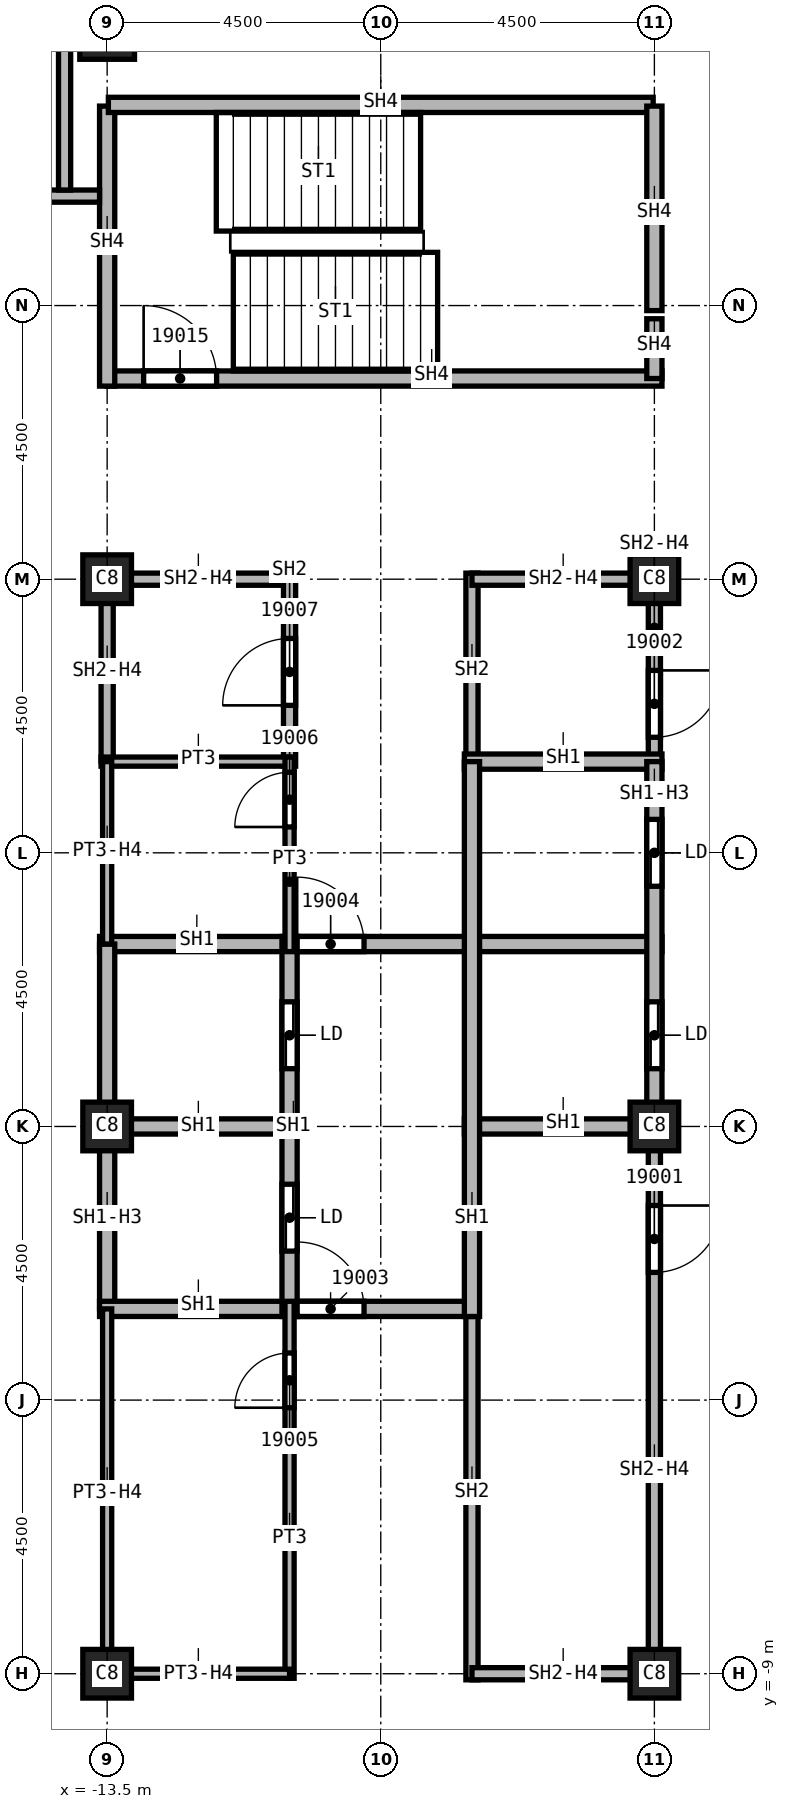
"""IFC4 building model, lengths in metres.
Left out: names, types, materials, properties, quantities, classifications, styles, units other than length and angle.
Written with IfcOpenShell. Run it as: python <this file> out.ifc"""

import sys

from ifc_helpers import new_model, si_unit, direction, frame, frame_2d, origin, origin_2d, place, context, subcontext, project, spatial, rectangle, extrude, element, fill, save


model = new_model("IFC4")
c1 = context("Model", 3, precision=1e-05, world=origin(), true_north=direction((0.0, 1.0)))
c2 = subcontext(c1, "Body", "Model", "MODEL_VIEW")
j1 = project(units=[si_unit("LENGTHUNIT", "METRE"), si_unit("PLANEANGLEUNIT", "RADIAN")], contexts=[c1])
p1 = place(None, origin())
s1 = spatial("IfcSite", under=j1, at=p1, CompositionType="ELEMENT")
p2 = place(p1, origin())
s2 = spatial("IfcBuilding", under=s1, at=p2, CompositionType="ELEMENT")
p3 = place(p2, frame((0.0, 0.0, 282.0)))
s3 = spatial("IfcBuildingStorey", under=s2, at=p3, CompositionType="ELEMENT", Elevation=282.0)
p4 = place(p3, frame((-13.5, 18.0, 0.0), z_axis=(0.0, 0.0, 1.0), x_axis=(1.0, 0.0, 0.0)))
e1 = element("IfcColumn", 1, at=p4, inside=s3, PredefinedType="COLUMN", context=c2, shape_type="SweptSolid", body=[
    extrude(rectangle(XDim=0.9, YDim=0.9, at=origin_2d()), origin(), (0.0, 0.0, 1.0), 3.72),
])
for number, where, z_axis, x_axis in (
    (2, (-4.5, 0.0, 0.0), (0.0, 0.0, 1.0), (1.0, 0.0, 0.0)),
    (3, (-4.5, 9.0, 0.0), (0.0, 0.0, 1.0), (1.0, 0.0, 0.0)),
    (4, (-4.5, -9.0, 0.0), (0.0, 0.0, 1.0), (1.0, 0.0, 0.0)),
    (5, (-13.5, 0.0, 0.0), (0.0, 0.0, 1.0), (1.0, 0.0, 0.0)),
    (6, (-13.5, 9.0, 0.0), (0.0, 0.0, 1.0), (1.0, 0.0, 0.0)),
    (7, (-13.5, -9.0, 0.0), (0.0, 0.0, 1.0), (1.0, 0.0, 0.0)),
):
    element("IfcColumn", number, at=place(p3, frame(where, z_axis=z_axis, x_axis=x_axis)), inside=s3, PredefinedType="COLUMN", context=c2, shape_type="SweptSolid", body=[
        extrude(rectangle(XDim=0.8, YDim=0.8, at=origin_2d()), origin(), (0.0, 0.0, 1.0), 3.72),
    ])
p5 = place(p3, frame((-13.5, 6.0, 0.0), z_axis=(0.0, 0.0, 1.0), x_axis=(0.0, 1.0, 0.0)))
e8 = element("IfcWall", 8, at=p5, inside=s3, PredefinedType="SOLIDWALL", context=c2, shape_type="SweptSolid", body=[
    extrude(rectangle(XDim=3.1, YDim=0.2, at=frame_2d((1.55, 0.0))), origin(), (0.0, 0.0, 1.0), 3.042),
])
p6 = place(p3, frame((-13.5, 9.0, 0.0), z_axis=(0.0, 0.0, 1.0), x_axis=(1.0, 0.0, 0.0)))
e9 = element("IfcWall", 9, at=p6, inside=s3, PredefinedType="SOLIDWALL", context=c2, shape_type="SweptSolid", body=[
    extrude(rectangle(XDim=3.0, YDim=0.2, at=frame_2d((1.5, 0.0))), origin(), (0.0, 0.0, 1.0), 3.042),
])
p7 = place(p3, frame((-10.5, 5.925, 0.0), z_axis=(0.0, 0.0, 1.0), x_axis=(0.0, 1.0, 0.0)))
e10 = element("IfcWall", 10, at=p7, inside=s3, PredefinedType="SOLIDWALL", context=c2, shape_type="SweptSolid", body=[
    extrude(rectangle(XDim=3.175, YDim=0.2, at=frame_2d((1.587, 0.0))), origin(), (0.0, 0.0, 1.0), 3.72),
])
p8 = place(p7, frame((1.0, 0.0, 0.0)))
e11 = element("IfcOpeningElement", 11, at=p8, cuts=e10, PredefinedType="OPENING", context=c2, shape_type="SweptSolid", body=[
    extrude(rectangle(XDim=1.1, YDim=2.1, at=frame_2d((0.55, 1.05))), frame((0.0, 0.1, 0.0), z_axis=(0.0, -1.0, 0.0), x_axis=(1.0, 0.0, 0.0)), (0.0, 0.0, 1.0), 0.2),
])
p9 = place(p3, frame((-7.5, -9.1, 0.0), z_axis=(0.0, 0.0, 1.0), x_axis=(0.0, 1.0, 0.0)))
e12 = element("IfcWall", 12, at=p9, inside=s3, PredefinedType="SOLIDWALL", context=c2, shape_type="SweptSolid", body=[
    extrude(rectangle(XDim=6.225, YDim=0.2, at=frame_2d((3.113, 0.0))), origin(), (0.0, 0.0, 1.0), 3.72),
])
p10 = place(p3, frame((-7.5, 6.0, 0.0), z_axis=(0.0, 0.0, 1.0), x_axis=(0.0, 1.0, 0.0)))
e13 = element("IfcWall", 13, at=p10, inside=s3, PredefinedType="SOLIDWALL", context=c2, shape_type="SweptSolid", body=[
    extrude(rectangle(XDim=3.1, YDim=0.2, at=frame_2d((1.55, 0.0))), origin(), (0.0, 0.0, 1.0), 3.72),
])
for number, where, z_axis, x_axis in (
    (14, (-7.5, 9.0, 0.0), (0.0, 0.0, 1.0), (1.0, 0.0, 0.0)),
    (15, (-4.5, -9.0, 0.0), (0.0, 0.0, 1.0), (-1.0, 0.0, 0.0)),
):
    element("IfcWall", number, at=place(p3, frame(where, z_axis=z_axis, x_axis=x_axis)), inside=s3, PredefinedType="SOLIDWALL", context=c2, shape_type="SweptSolid", body=[
        extrude(rectangle(XDim=3.0, YDim=0.2, at=frame_2d((1.5, 0.0))), origin(), (0.0, 0.0, 1.0), 3.042),
    ])
p11 = place(p3, frame((-4.5, 0.0, 0.0), z_axis=(0.0, 0.0, 1.0), x_axis=(0.0, -1.0, 0.0)))
e16 = element("IfcWall", 16, at=p11, inside=s3, PredefinedType="SOLIDWALL", context=c2, shape_type="SweptSolid", body=[
    extrude(rectangle(XDim=9.1, YDim=0.2, at=frame_2d((4.55, 0.0))), origin(), (0.0, 0.0, 1.0), 3.042),
])
p12 = place(p11, frame((1.3, 0.0, 0.0)))
e17 = element("IfcOpeningElement", 17, at=p12, cuts=e16, PredefinedType="OPENING", context=c2, shape_type="SweptSolid", body=[
    extrude(rectangle(XDim=1.1, YDim=2.1, at=frame_2d((0.55, 1.05))), frame((0.0, 0.1, 0.0), z_axis=(0.0, -1.0, 0.0), x_axis=(1.0, 0.0, 0.0)), (0.0, 0.0, 1.0), 0.2),
])
p13 = place(p3, frame((-4.5, 9.1, 0.0), z_axis=(0.0, 0.0, 1.0), x_axis=(0.0, -1.0, 0.0)))
e18 = element("IfcWall", 18, at=p13, inside=s3, PredefinedType="SOLIDWALL", context=c2, shape_type="SweptSolid", body=[
    extrude(rectangle(XDim=3.1, YDim=0.2, at=frame_2d((1.55, 0.0))), origin(), (0.0, 0.0, 1.0), 3.042),
])
p14 = place(p13, frame((1.6, 0.0, 0.0)))
e19 = element("IfcOpeningElement", 19, at=p14, cuts=e18, PredefinedType="OPENING", context=c2, shape_type="SweptSolid", body=[
    extrude(rectangle(XDim=1.1, YDim=2.1, at=frame_2d((0.55, 1.05))), frame((0.0, 0.1, 0.0), z_axis=(0.0, -1.0, 0.0), x_axis=(1.0, 0.0, 0.0)), (0.0, 0.0, 1.0), 0.2),
])
p15 = place(p3, frame((-13.625, 0.0, 0.0), z_axis=(0.0, 0.0, 1.0), x_axis=(1.0, 0.0, 0.0)))
e20 = element("IfcWall", 20, at=p15, inside=s3, PredefinedType="SOLIDWALL", context=c2, shape_type="SweptSolid", body=[
    extrude(rectangle(XDim=3.125, YDim=0.25, at=frame_2d((1.562, 0.0))), origin(), (0.0, 0.0, 1.0), 3.72),
])
p16 = place(p3, frame((-13.625, 3.0, 0.0), z_axis=(0.0, 0.0, 1.0), x_axis=(1.0, 0.0, 0.0)))
e21 = element("IfcWall", 21, at=p16, inside=s3, PredefinedType="SOLIDWALL", context=c2, shape_type="SweptSolid", body=[
    extrude(rectangle(XDim=9.25, YDim=0.25, at=frame_2d((4.625, 0.0))), origin(), (0.0, 0.0, 1.0), 3.72),
])
p17 = place(p16, frame((3.25, 0.0, 0.0)))
e22 = element("IfcOpeningElement", 22, at=p17, cuts=e21, PredefinedType="OPENING", context=c2, shape_type="SweptSolid", body=[
    extrude(rectangle(XDim=1.1, YDim=2.1, at=frame_2d((0.55, 1.05))), frame((0.0, 0.125, 0.0), z_axis=(0.0, -1.0, 0.0), x_axis=(1.0, 0.0, 0.0)), (0.0, 0.0, 1.0), 0.25),
])
p18 = place(p3, frame((-13.5, -3.0, 0.0), z_axis=(0.0, 0.0, 1.0), x_axis=(0.0, 1.0, 0.0)))
e23 = element("IfcWall", 23, at=p18, inside=s3, PredefinedType="SOLIDWALL", context=c2, shape_type="SweptSolid", body=[
    extrude(rectangle(XDim=6.0, YDim=0.25, at=frame_2d((3.0, 0.0))), origin(), (0.0, 0.0, 1.0), 3.042),
])
p19 = place(p3, frame((-13.625, -3.0, 0.0), z_axis=(0.0, 0.0, 1.0), x_axis=(1.0, 0.0, 0.0)))
e24 = element("IfcWall", 24, at=p19, inside=s3, PredefinedType="SOLIDWALL", context=c2, shape_type="SweptSolid", body=[
    extrude(rectangle(XDim=6.125, YDim=0.25, at=frame_2d((3.062, 0.0))), origin(), (0.0, 0.0, 1.0), 3.72),
])
p20 = place(p19, frame((3.25, 0.0, 0.0)))
e25 = element("IfcOpeningElement", 25, at=p20, cuts=e24, PredefinedType="OPENING", context=c2, shape_type="SweptSolid", body=[
    extrude(rectangle(XDim=1.1, YDim=2.1, at=frame_2d((0.55, 1.05))), frame((0.0, 0.125, 0.0), z_axis=(0.0, -1.0, 0.0), x_axis=(1.0, 0.0, 0.0)), (0.0, 0.0, 1.0), 0.25),
])
p21 = place(p3, frame((-10.5, -3.125, 0.0), z_axis=(0.0, 0.0, 1.0), x_axis=(0.0, 1.0, 0.0)))
e26 = element("IfcWall", 26, at=p21, inside=s3, PredefinedType="SOLIDWALL", context=c2, shape_type="SweptSolid", body=[
    extrude(rectangle(XDim=6.25, YDim=0.25, at=frame_2d((3.125, 0.0))), origin(), (0.0, 0.0, 1.0), 3.72),
])
p22 = place(p21, frame((1.075, 0.0, 0.0)))
e27 = element("IfcOpeningElement", 27, at=p22, cuts=e26, PredefinedType="OPENING", context=c2, shape_type="SweptSolid", body=[
    extrude(rectangle(XDim=1.1, YDim=2.1, at=frame_2d((0.55, 1.05))), frame((0.0, 0.125, 0.0), z_axis=(0.0, -1.0, 0.0), x_axis=(1.0, 0.0, 0.0)), (0.0, 0.0, 1.0), 0.25),
])
p23 = place(p21, frame((4.075, 0.0, 0.0)))
e28 = element("IfcOpeningElement", 28, at=p23, cuts=e26, PredefinedType="OPENING", context=c2, shape_type="SweptSolid", body=[
    extrude(rectangle(XDim=1.1, YDim=2.1, at=frame_2d((0.55, 1.05))), frame((0.0, 0.125, 0.0), z_axis=(0.0, -1.0, 0.0), x_axis=(1.0, 0.0, 0.0)), (0.0, 0.0, 1.0), 0.25),
])
for number, where, z_axis, x_axis in (
    (29, (-7.625, 0.0, 0.0), (0.0, 0.0, 1.0), (1.0, 0.0, 0.0)),
    (30, (-7.625, 6.0, 0.0), (0.0, 0.0, 1.0), (1.0, 0.0, 0.0)),
):
    element("IfcWall", number, at=place(p3, frame(where, z_axis=z_axis, x_axis=x_axis)), inside=s3, PredefinedType="SOLIDWALL", context=c2, shape_type="SweptSolid", body=[
        extrude(rectangle(XDim=3.25, YDim=0.25, at=frame_2d((1.625, 0.0))), origin(), (0.0, 0.0, 1.0), 3.72),
    ])
p24 = place(p3, frame((-7.5, -3.125, 0.0), z_axis=(0.0, 0.0, 1.0), x_axis=(0.0, 1.0, 0.0)))
e31 = element("IfcWall", 31, at=p24, inside=s3, PredefinedType="SOLIDWALL", context=c2, shape_type="SweptSolid", body=[
    extrude(rectangle(XDim=9.125, YDim=0.25, at=frame_2d((4.562, 0.0))), origin(), (0.0, 0.0, 1.0), 3.72),
])
p25 = place(p3, frame((-4.5, 6.0, 0.0), z_axis=(0.0, 0.0, 1.0), x_axis=(0.0, -1.0, 0.0)))
e32 = element("IfcWall", 32, at=p25, inside=s3, PredefinedType="SOLIDWALL", context=c2, shape_type="SweptSolid", body=[
    extrude(rectangle(XDim=6.0, YDim=0.25, at=frame_2d((3.0, 0.0))), origin(), (0.0, 0.0, 1.0), 3.042),
])
p26 = place(p25, frame((3.95, 0.0, 0.0)))
e33 = element("IfcOpeningElement", 33, at=p26, cuts=e32, PredefinedType="OPENING", context=c2, shape_type="SweptSolid", body=[
    extrude(rectangle(XDim=1.1, YDim=2.1, at=frame_2d((0.55, 1.05))), frame((0.0, 0.125, 0.0), z_axis=(0.0, -1.0, 0.0), x_axis=(1.0, 0.0, 0.0)), (0.0, 0.0, 1.0), 0.25),
])
p27 = place(p25, frame((0.95, 0.0, 0.0)))
e34 = element("IfcOpeningElement", 34, at=p27, cuts=e32, PredefinedType="OPENING", context=c2, shape_type="SweptSolid", body=[
    extrude(rectangle(XDim=1.1, YDim=2.1, at=frame_2d((0.55, 1.05))), frame((0.0, 0.125, 0.0), z_axis=(0.0, -1.0, 0.0), x_axis=(1.0, 0.0, 0.0)), (0.0, 0.0, 1.0), 0.25),
])
p28 = place(p3, frame((-13.5, 12.3, 0.0), z_axis=(0.0, 0.0, 1.0), x_axis=(1.0, 0.0, 0.0)))
e35 = element("IfcWall", 35, at=p28, inside=s3, PredefinedType="SOLIDWALL", context=c2, shape_type="SweptSolid", body=[
    extrude(rectangle(XDim=9.125, YDim=0.25, at=frame_2d((4.562, 0.0))), origin(), (0.0, 0.0, 1.0), 3.72),
])
p29 = place(p28, frame((0.6, 0.0, 0.0)))
e36 = element("IfcOpeningElement", 36, at=p29, cuts=e35, PredefinedType="OPENING", context=c2, shape_type="SweptSolid", body=[
    extrude(rectangle(XDim=1.2, YDim=2.1, at=frame_2d((0.6, 1.05))), frame((0.0, 0.125, 0.0), z_axis=(0.0, -1.0, 0.0), x_axis=(1.0, 0.0, 0.0)), (0.0, 0.0, 1.0), 0.25),
])
p30 = place(p3, frame((-13.5, 16.78, 0.0), z_axis=(0.0, 0.0, 1.0), x_axis=(0.0, -1.0, 0.0)))
e37 = element("IfcWall", 37, at=p30, inside=s3, PredefinedType="SOLIDWALL", context=c2, shape_type="SweptSolid", body=[
    extrude(rectangle(XDim=4.605, YDim=0.25, at=frame_2d((2.302, 0.0))), origin(), (0.0, 0.0, 1.0), 3.72),
])
p31 = place(p3, frame((-13.48, 16.8, 0.0), z_axis=(0.0, 0.0, 1.0), x_axis=(1.0, 0.0, 0.0)))
e38 = element("IfcWall", 38, at=p31, inside=s3, PredefinedType="SOLIDWALL", context=c2, shape_type="SweptSolid", body=[
    extrude(rectangle(XDim=8.96, YDim=0.25, at=frame_2d((4.48, 0.0))), origin(), (0.0, 0.0, 1.0), 3.72),
])
p32 = place(p3, frame((-4.5, 13.283, 0.0), z_axis=(0.0, 0.0, 1.0), x_axis=(0.0, -1.0, 0.0)))
e39 = element("IfcWall", 39, at=p32, inside=s3, PredefinedType="SOLIDWALL", context=c2, shape_type="SweptSolid", body=[
    extrude(rectangle(XDim=0.983, YDim=0.25, at=frame_2d((0.491, 0.0))), origin(), (0.0, 0.0, 1.0), 3.72),
])
p33 = place(p3, frame((-4.5, 16.78, 0.0), z_axis=(0.0, 0.0, 1.0), x_axis=(0.0, -1.0, 0.0)))
e40 = element("IfcWall", 40, at=p33, inside=s3, PredefinedType="SOLIDWALL", context=c2, shape_type="SweptSolid", body=[
    extrude(rectangle(XDim=3.363, YDim=0.25, at=frame_2d((1.682, 0.0))), origin(), (0.0, 0.0, 1.0), 3.72),
])
p34 = place(p3, frame((-13.6, 6.0, 0.0), z_axis=(0.0, 0.0, 1.0), x_axis=(1.0, 0.0, 0.0)))
e41 = element("IfcWall", 41, at=p34, inside=s3, PredefinedType="PARTITIONING", context=c2, shape_type="SweptSolid", body=[
    extrude(rectangle(XDim=3.1, YDim=0.15, at=frame_2d((1.55, 0.0))), origin(), (0.0, 0.0, 1.0), 3.72),
])
p35 = place(p3, frame((-13.5, -9.075, 0.0), z_axis=(0.0, 0.0, 1.0), x_axis=(0.0, 1.0, 0.0)))
e42 = element("IfcWall", 42, at=p35, inside=s3, PredefinedType="PARTITIONING", context=c2, shape_type="SweptSolid", body=[
    extrude(rectangle(XDim=6.075, YDim=0.15, at=frame_2d((3.038, 0.0))), origin(), (0.0, 0.0, 1.0), 3.042),
])
p36 = place(p3, frame((-13.5, 3.0, 0.0), z_axis=(0.0, 0.0, 1.0), x_axis=(0.0, 1.0, 0.0)))
e43 = element("IfcWall", 43, at=p36, inside=s3, PredefinedType="PARTITIONING", context=c2, shape_type="SweptSolid", body=[
    extrude(rectangle(XDim=3.0, YDim=0.15, at=frame_2d((1.5, 0.0))), origin(), (0.0, 0.0, 1.0), 3.042),
])
p37 = place(p3, frame((-10.5, -9.075, 0.0), z_axis=(0.0, 0.0, 1.0), x_axis=(0.0, 1.0, 0.0)))
e44 = element("IfcWall", 44, at=p37, inside=s3, PredefinedType="PARTITIONING", context=c2, shape_type="SweptSolid", body=[
    extrude(rectangle(XDim=6.2, YDim=0.15, at=frame_2d((3.1, 0.0))), origin(), (0.0, 0.0, 1.0), 3.72),
])
p38 = place(p37, frame((4.45, 0.0, 0.0)))
e45 = element("IfcOpeningElement", 45, at=p38, cuts=e44, PredefinedType="OPENING", context=c2, shape_type="SweptSolid", body=[
    extrude(rectangle(XDim=0.9, YDim=2.1, at=frame_2d((0.45, 1.05))), frame((0.0, 0.075, 0.0), z_axis=(0.0, -1.0, 0.0), x_axis=(1.0, 0.0, 0.0)), (0.0, 0.0, 1.0), 0.15),
])
p39 = place(p3, frame((-10.5, -9.0, 0.0), z_axis=(0.0, 0.0, 1.0), x_axis=(-1.0, 0.0, 0.0)))
e46 = element("IfcWall", 46, at=p39, inside=s3, PredefinedType="PARTITIONING", context=c2, shape_type="SweptSolid", body=[
    extrude(rectangle(XDim=3.0, YDim=0.15, at=frame_2d((1.5, 0.0))), origin(), (0.0, 0.0, 1.0), 3.042),
])
p40 = place(p3, frame((-10.5, 2.875, 0.0), z_axis=(0.0, 0.0, 1.0), x_axis=(0.0, 1.0, 0.0)))
e47 = element("IfcWall", 47, at=p40, inside=s3, PredefinedType="PARTITIONING", context=c2, shape_type="SweptSolid", body=[
    extrude(rectangle(XDim=3.2, YDim=0.15, at=frame_2d((1.6, 0.0))), origin(), (0.0, 0.0, 1.0), 3.72),
])
p41 = place(p40, frame((2.05, 0.0, 0.0)))
e48 = element("IfcOpeningElement", 48, at=p41, cuts=e47, PredefinedType="OPENING", context=c2, shape_type="SweptSolid", body=[
    extrude(rectangle(XDim=0.9, YDim=2.1, at=frame_2d((0.45, 1.05))), frame((0.0, 0.075, 0.0), z_axis=(0.0, -1.0, 0.0), x_axis=(1.0, 0.0, 0.0)), (0.0, 0.0, 1.0), 0.15),
])
p42 = place(p3, frame((-21.9, 15.3, 0.0), z_axis=(0.0, 0.0, 1.0), x_axis=(1.0, 0.0, 0.0)))
e49 = element("IfcWall", 49, at=p42, inside=s3, PredefinedType="SOLIDWALL", context=c2, shape_type="SweptSolid", body=[
    extrude(rectangle(XDim=8.275, YDim=0.2, at=frame_2d((4.137, 0.0))), origin(), (0.0, 0.0, 1.0), 3.72),
])
p43 = place(p42, frame((4.8, 0.0, 0.0)))
e50 = element("IfcOpeningElement", 50, at=p43, cuts=e49, PredefinedType="OPENING", context=c2, shape_type="SweptSolid", body=[
    extrude(rectangle(XDim=1.2, YDim=2.1, at=frame_2d((0.6, 1.05))), frame((0.0, 0.1, 0.0), z_axis=(0.0, -1.0, 0.0), x_axis=(1.0, 0.0, 0.0)), (0.0, 0.0, 1.0), 0.2),
])
p44 = place(p3, frame((-14.2, 15.4, 0.0), z_axis=(0.0, 0.0, 1.0), x_axis=(0.0, 1.0, 0.0)))
e51 = element("IfcWall", 51, at=p44, inside=s3, PredefinedType="SOLIDWALL", context=c2, shape_type="SweptSolid", body=[
    extrude(rectangle(XDim=5.9, YDim=0.2, at=frame_2d((2.95, 0.0))), origin(), (0.0, 0.0, 1.0), 3.72),
])
p45 = place(p12, origin())
e52 = element("IfcDoor", 52, at=p45, inside=s3, OperationType="SINGLE_SWING_RIGHT", PredefinedType="DOOR", context=c2, shape_type="SweptSolid", body=[
    extrude(rectangle(XDim=1.1, YDim=2.1, at=frame_2d((0.55, 1.05))), frame((0.0, 0.025, 0.0), z_axis=(0.0, -1.0, 0.0), x_axis=(1.0, 0.0, 0.0)), (0.0, 0.0, 1.0), 0.05),
])
fill(e17, e52)
p46 = place(p14, origin())
e53 = element("IfcDoor", 53, at=p46, inside=s3, OperationType="SINGLE_SWING_LEFT", PredefinedType="DOOR", context=c2, shape_type="SweptSolid", body=[
    extrude(rectangle(XDim=1.1, YDim=2.1, at=frame_2d((0.55, 1.05))), frame((0.0, 0.025, 0.0), z_axis=(0.0, -1.0, 0.0), x_axis=(1.0, 0.0, 0.0)), (0.0, 0.0, 1.0), 0.05),
])
fill(e19, e53)
p47 = place(p20, origin())
e54 = element("IfcDoor", 54, at=p47, inside=s3, OperationType="SINGLE_SWING_RIGHT", PredefinedType="DOOR", context=c2, shape_type="SweptSolid", body=[
    extrude(rectangle(XDim=1.1, YDim=2.1, at=frame_2d((0.55, 1.05))), frame((0.0, 0.025, 0.0), z_axis=(0.0, -1.0, 0.0), x_axis=(1.0, 0.0, 0.0)), (0.0, 0.0, 1.0), 0.05),
])
fill(e25, e54)
p48 = place(p17, origin())
e55 = element("IfcDoor", 55, at=p48, inside=s3, OperationType="SINGLE_SWING_LEFT", PredefinedType="DOOR", context=c2, shape_type="SweptSolid", body=[
    extrude(rectangle(XDim=1.1, YDim=2.1, at=frame_2d((0.55, 1.05))), frame((0.0, 0.025, 0.0), z_axis=(0.0, -1.0, 0.0), x_axis=(1.0, 0.0, 0.0)), (0.0, 0.0, 1.0), 0.05),
])
fill(e22, e55)
p49 = place(p38, origin())
e56 = element("IfcDoor", 56, at=p49, inside=s3, OperationType="SINGLE_SWING_RIGHT", PredefinedType="DOOR", context=c2, shape_type="SweptSolid", body=[
    extrude(rectangle(XDim=0.9, YDim=2.1, at=frame_2d((0.45, 1.05))), frame((0.0, 0.025, 0.0), z_axis=(0.0, -1.0, 0.0), x_axis=(1.0, 0.0, 0.0)), (0.0, 0.0, 1.0), 0.05),
])
fill(e45, e56)
p50 = place(p41, origin())
e57 = element("IfcDoor", 57, at=p50, inside=s3, OperationType="SINGLE_SWING_LEFT", PredefinedType="DOOR", context=c2, shape_type="SweptSolid", body=[
    extrude(rectangle(XDim=0.9, YDim=2.1, at=frame_2d((0.45, 1.05))), frame((0.0, 0.025, 0.0), z_axis=(0.0, -1.0, 0.0), x_axis=(1.0, 0.0, 0.0)), (0.0, 0.0, 1.0), 0.05),
])
fill(e48, e57)
p51 = place(p8, origin())
e58 = element("IfcDoor", 58, at=p51, inside=s3, OperationType="SINGLE_SWING_RIGHT", PredefinedType="DOOR", context=c2, shape_type="SweptSolid", body=[
    extrude(rectangle(XDim=1.1, YDim=2.1, at=frame_2d((0.55, 1.05))), frame((0.0, 0.025, 0.0), z_axis=(0.0, -1.0, 0.0), x_axis=(1.0, 0.0, 0.0)), (0.0, 0.0, 1.0), 0.05),
])
fill(e11, e58)
p52 = place(p29, origin())
e59 = element("IfcDoor", 59, at=p52, inside=s3, OperationType="SINGLE_SWING_RIGHT", PredefinedType="DOOR", context=c2, shape_type="SweptSolid", body=[
    extrude(rectangle(XDim=1.2, YDim=2.1, at=frame_2d((0.6, 1.05))), frame((0.0, 0.025, 0.0), z_axis=(0.0, -1.0, 0.0), x_axis=(1.0, 0.0, 0.0)), (0.0, 0.0, 1.0), 0.05),
])
fill(e36, e59)
p53 = place(p26, origin())
e60 = element("IfcDoor", 60, at=p53, inside=s3, OperationType="SLIDING_TO_LEFT", PredefinedType="DOOR", context=c2, shape_type="SweptSolid", body=[
    extrude(rectangle(XDim=1.1, YDim=2.1, at=frame_2d((0.55, 1.05))), frame((0.0, 0.025, 0.0), z_axis=(0.0, -1.0, 0.0), x_axis=(1.0, 0.0, 0.0)), (0.0, 0.0, 1.0), 0.05),
])
fill(e33, e60)
p54 = place(p27, origin())
e61 = element("IfcDoor", 61, at=p54, inside=s3, OperationType="SLIDING_TO_LEFT", PredefinedType="DOOR", context=c2, shape_type="SweptSolid", body=[
    extrude(rectangle(XDim=1.1, YDim=2.1, at=frame_2d((0.55, 1.05))), frame((0.0, 0.025, 0.0), z_axis=(0.0, -1.0, 0.0), x_axis=(1.0, 0.0, 0.0)), (0.0, 0.0, 1.0), 0.05),
])
fill(e34, e61)
p55 = place(p22, origin())
e62 = element("IfcDoor", 62, at=p55, inside=s3, OperationType="SLIDING_TO_LEFT", PredefinedType="DOOR", context=c2, shape_type="SweptSolid", body=[
    extrude(rectangle(XDim=1.1, YDim=2.1, at=frame_2d((0.55, 1.05))), frame((0.0, 0.025, 0.0), z_axis=(0.0, -1.0, 0.0), x_axis=(1.0, 0.0, 0.0)), (0.0, 0.0, 1.0), 0.05),
])
fill(e27, e62)
p56 = place(p23, origin())
e63 = element("IfcDoor", 63, at=p56, inside=s3, OperationType="SLIDING_TO_LEFT", PredefinedType="DOOR", context=c2, shape_type="SweptSolid", body=[
    extrude(rectangle(XDim=1.1, YDim=2.1, at=frame_2d((0.55, 1.05))), frame((0.0, 0.025, 0.0), z_axis=(0.0, -1.0, 0.0), x_axis=(1.0, 0.0, 0.0)), (0.0, 0.0, 1.0), 0.05),
])
fill(e28, e63)
save(model, sys.argv[1])
